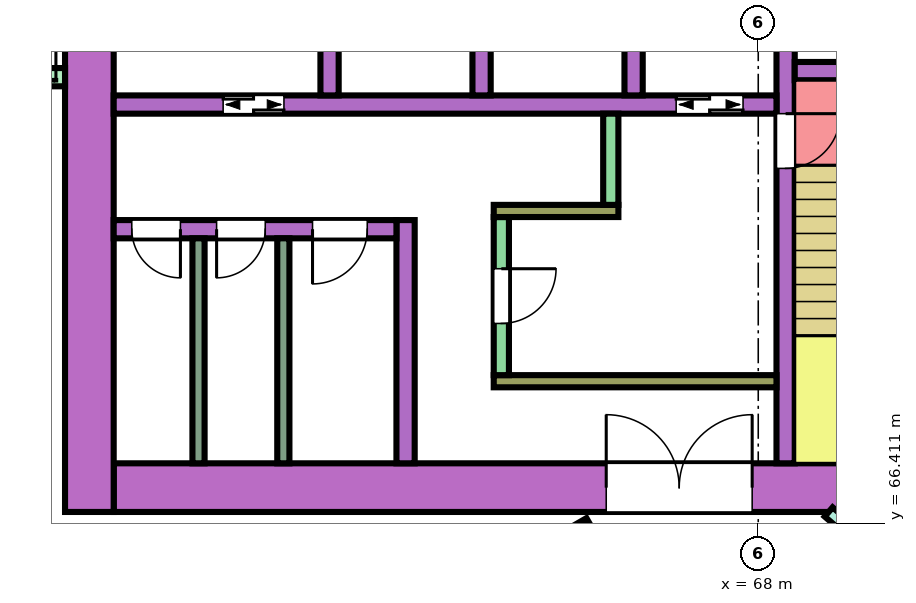
"""IFC4 building model, lengths in metres.
Left out: names, types, materials, properties, quantities, classifications, styles, units other than length and angle.
Written with IfcOpenShell. Run it as: python <this file> out.ifc"""

import sys

from ifc_helpers import new_model, si_unit, direction, frame, frame_2d, origin, place, context, subcontext, project, spatial, rectangle, extrude, element, fill, save


model = new_model("IFC4")
c1 = context("Model", 3, precision=1e-05, world=origin(), true_north=direction((0.0, 1.0)))
c2 = subcontext(c1, "Body", "Model", "MODEL_VIEW")
j1 = project(units=[si_unit("LENGTHUNIT", "METRE"), si_unit("PLANEANGLEUNIT", "RADIAN")], contexts=[c1])
p1 = place(None, origin())
s1 = spatial("IfcSite", under=j1, at=p1, CompositionType="ELEMENT")
p2 = place(p1, origin())
s2 = spatial("IfcBuilding", under=s1, at=p2, CompositionType="ELEMENT")
p3 = place(p2, frame((0.0, 0.0, 28.8)))
s3 = spatial("IfcBuildingStorey", under=s2, at=p3, CompositionType="ELEMENT", Elevation=28.8)
p4 = place(p3, frame((72.1, 67.0, 0.0), z_axis=(0.0, 0.0, 1.0), x_axis=(-1.0, 0.0, 0.0)))
e1 = element("IfcWall", 1, at=p4, inside=s3, PredefinedType="SHEAR", context=c2, shape_type="SweptSolid", body=[
    extrude(rectangle(XDim=14.7, YDim=0.8, at=frame_2d((7.35, 0.0))), origin(), (0.0, 0.0, 1.0), 3.48),
])
p5 = place(p4, frame((4.2, 0.0, 0.0)))
e2 = element("IfcOpeningElement", 2, at=p5, cuts=e1, PredefinedType="OPENING", context=c2, shape_type="SweptSolid", body=[
    extrude(rectangle(XDim=2.4, YDim=2.4, at=frame_2d((1.2, 1.2))), frame((0.0, 0.41, 0.0), z_axis=(0.0, -1.0, 0.0), x_axis=(1.0, 0.0, 0.0)), (0.0, 0.0, 1.0), 0.82),
])
p6 = place(p3, frame((57.0, 83.4, 0.0), z_axis=(0.0, 0.0, 1.0), x_axis=(0.0, -1.0, 0.0)))
e3 = element("IfcWall", 3, at=p6, inside=s3, PredefinedType="SHEAR", context=c2, shape_type="SweptSolid", body=[
    extrude(rectangle(XDim=16.8, YDim=0.8, at=frame_2d((8.4, 0.0))), origin(), (0.0, 0.0, 1.0), 3.48),
])
p7 = place(p3, frame((68.45, 75.0, 0.0), z_axis=(0.0, 0.0, 1.0), x_axis=(0.0, -1.0, 0.0)))
e4 = element("IfcWall", 4, at=p7, inside=s3, PredefinedType="SHEAR", context=c2, shape_type="SweptSolid", body=[
    extrude(rectangle(XDim=7.6, YDim=0.3, at=frame_2d((3.8, 0.0))), origin(), (0.0, 0.0, 1.0), 3.48),
])
p8 = place(p7, frame((1.85, 0.0, 0.0)))
e5 = element("IfcOpeningElement", 5, at=p8, cuts=e4, PredefinedType="OPENING", context=c2, shape_type="SweptSolid", body=[
    extrude(rectangle(XDim=0.9, YDim=2.1, at=frame_2d((0.45, 1.05))), frame((0.0, 0.16, 0.0), z_axis=(0.0, -1.0, 0.0), x_axis=(1.0, 0.0, 0.0)), (0.0, 0.0, 1.0), 0.32),
])
p9 = place(p3, frame((71.65, 73.85, 0.0), z_axis=(0.0, 0.0, 1.0), x_axis=(-1.0, 0.0, 0.0)))
e6 = element("IfcWall", 6, at=p9, inside=s3, PredefinedType="SHEAR", context=c2, shape_type="SweptSolid", body=[
    extrude(rectangle(XDim=3.05, YDim=0.3, at=frame_2d((1.525, 0.0))), origin(), (0.0, 0.0, 1.0), 3.48),
])
p10 = place(p9, frame((1.1, 0.0, 0.0)))
e7 = element("IfcOpeningElement", 7, at=p10, cuts=e6, PredefinedType="OPENING", context=c2, shape_type="SweptSolid", body=[
    extrude(rectangle(XDim=0.7, YDim=2.0, at=frame_2d((0.35, 1.0))), frame((0.0, 0.16, 0.0), z_axis=(0.0, -1.0, 0.0), x_axis=(1.0, 0.0, 0.0)), (0.0, 0.0, 1.0), 0.32),
])
p11 = place(p3, frame((68.3, 73.3, 0.0), z_axis=(0.0, 0.0, 1.0), x_axis=(-1.0, 0.0, 0.0)))
e8 = element("IfcWall", 8, at=p11, inside=s3, PredefinedType="SHEAR", context=c2, shape_type="SweptSolid", body=[
    extrude(rectangle(XDim=10.9, YDim=0.3, at=frame_2d((5.45, 0.0))), origin(), (0.0, 0.0, 1.0), 3.48),
])
p12 = place(p11, frame((0.55, 0.0, 0.0)))
e9 = element("IfcOpeningElement", 9, at=p12, cuts=e8, PredefinedType="OPENING", context=c2, shape_type="SweptSolid", body=[
    extrude(rectangle(XDim=1.1, YDim=2.1, at=frame_2d((0.55, 1.05))), frame((0.0, 0.16, 0.0), z_axis=(0.0, -1.0, 0.0), x_axis=(1.0, 0.0, 0.0)), (0.0, 0.0, 1.0), 0.32),
])
p13 = place(p11, frame((8.1, 0.0, 0.0)))
e10 = element("IfcOpeningElement", 10, at=p13, cuts=e8, PredefinedType="OPENING", context=c2, shape_type="SweptSolid", body=[
    extrude(rectangle(XDim=1.0, YDim=2.1, at=frame_2d((0.5, 1.05))), frame((0.0, 0.16, 0.0), z_axis=(0.0, -1.0, 0.0), x_axis=(1.0, 0.0, 0.0)), (0.0, 0.0, 1.0), 0.32),
])
for number, where, z_axis, x_axis in (
    (11, (65.95, 76.0, 0.0), (0.0, 0.0, 1.0), (0.0, -1.0, 0.0)),
    (12, (63.45, 76.0, 0.0), (0.0, 0.0, 1.0), (0.0, -1.0, 0.0)),
    (13, (60.95, 76.0, 0.0), (0.0, 0.0, 1.0), (0.0, -1.0, 0.0)),
):
    element("IfcWall", number, at=place(p3, frame(where, z_axis=z_axis, x_axis=x_axis)), inside=s3, PredefinedType="SHEAR", context=c2, shape_type="SweptSolid", body=[
        extrude(rectangle(XDim=2.55, YDim=0.3, at=frame_2d((1.275, 0.0))), origin(), (0.0, 0.0, 1.0), 3.48),
    ])
p14 = place(p3, frame((68.3, 68.75, 0.0), z_axis=(0.0, 0.0, 1.0), x_axis=(-1.0, 0.0, 0.0)))
e14 = element("IfcWall", 14, at=p14, inside=s3, PredefinedType="SHEAR", context=c2, shape_type="SweptSolid", body=[
    extrude(rectangle(XDim=4.65, YDim=0.2, at=frame_2d((2.325, 0.0))), origin(), (0.0, 0.0, 1.0), 3.48),
])
p15 = place(p3, frame((63.775, 71.45, 0.0), z_axis=(0.0, 0.0, 1.0), x_axis=(0.0, -1.0, 0.0)))
e15 = element("IfcWall", 15, at=p15, inside=s3, PredefinedType="SHEAR", context=c2, shape_type="SweptSolid", body=[
    extrude(rectangle(XDim=2.6, YDim=0.25, at=frame_2d((1.3, 0.0))), origin(), (0.0, 0.0, 1.0), 3.48),
])
p16 = place(p15, frame((0.85, 0.0, 0.0)))
e16 = element("IfcOpeningElement", 16, at=p16, cuts=e15, PredefinedType="OPENING", context=c2, shape_type="SweptSolid", body=[
    extrude(rectangle(XDim=0.9, YDim=2.1, at=frame_2d((0.45, 1.05))), frame((0.0, 0.135, 0.0), z_axis=(0.0, -1.0, 0.0), x_axis=(1.0, 0.0, 0.0)), (0.0, 0.0, 1.0), 0.27),
])
p17 = place(p3, frame((65.7, 71.55, 0.0), z_axis=(0.0, 0.0, 1.0), x_axis=(-1.0, 0.0, 0.0)))
e17 = element("IfcWall", 17, at=p17, inside=s3, PredefinedType="SHEAR", context=c2, shape_type="SweptSolid", body=[
    extrude(rectangle(XDim=2.05, YDim=0.2, at=frame_2d((1.025, 0.0))), origin(), (0.0, 0.0, 1.0), 3.48),
])
p18 = place(p3, frame((65.575, 73.15, 0.0), z_axis=(0.0, 0.0, 1.0), x_axis=(0.0, -1.0, 0.0)))
e18 = element("IfcWall", 18, at=p18, inside=s3, PredefinedType="SHEAR", context=c2, shape_type="SweptSolid", body=[
    extrude(rectangle(XDim=1.5, YDim=0.25, at=frame_2d((0.75, 0.0))), origin(), (0.0, 0.0, 1.0), 3.48),
])
p19 = place(p3, frame((62.2, 71.4, 0.0), z_axis=(0.0, 0.0, 1.0), x_axis=(0.0, -1.0, 0.0)))
e19 = element("IfcWall", 19, at=p19, inside=s3, PredefinedType="SHEAR", context=c2, shape_type="SweptSolid", body=[
    extrude(rectangle(XDim=4.0, YDim=0.3, at=frame_2d((2.0, 0.0))), origin(), (0.0, 0.0, 1.0), 3.48),
])
p20 = place(p3, frame((62.05, 71.25, 0.0), z_axis=(0.0, 0.0, 1.0), x_axis=(-1.0, 0.0, 0.0)))
e20 = element("IfcWall", 20, at=p20, inside=s3, PredefinedType="SHEAR", context=c2, shape_type="SweptSolid", body=[
    extrude(rectangle(XDim=4.65, YDim=0.3, at=frame_2d((2.325, 0.0))), origin(), (0.0, 0.0, 1.0), 3.48),
])
p21 = place(p20, frame((0.48, 0.0, 0.0)))
e21 = element("IfcOpeningElement", 21, at=p21, cuts=e20, PredefinedType="OPENING", context=c2, shape_type="SweptSolid", body=[
    extrude(rectangle(XDim=0.9, YDim=2.1, at=frame_2d((0.45, 1.05))), frame((0.0, 0.16, 0.0), z_axis=(0.0, -1.0, 0.0), x_axis=(1.0, 0.0, 0.0)), (0.0, 0.0, 1.0), 0.32),
])
p22 = place(p20, frame((2.157, 0.0, 0.0)))
e22 = element("IfcOpeningElement", 22, at=p22, cuts=e20, PredefinedType="OPENING", context=c2, shape_type="SweptSolid", body=[
    extrude(rectangle(XDim=0.8, YDim=2.1, at=frame_2d((0.4, 1.05))), frame((0.0, 0.16, 0.0), z_axis=(0.0, -1.0, 0.0), x_axis=(1.0, 0.0, 0.0)), (0.0, 0.0, 1.0), 0.32),
])
p23 = place(p20, frame((3.552, 0.0, 0.0)))
e23 = element("IfcOpeningElement", 23, at=p23, cuts=e20, PredefinedType="OPENING", context=c2, shape_type="SweptSolid", body=[
    extrude(rectangle(XDim=0.8, YDim=2.1, at=frame_2d((0.4, 1.05))), frame((0.0, 0.16, 0.0), z_axis=(0.0, -1.0, 0.0), x_axis=(1.0, 0.0, 0.0)), (0.0, 0.0, 1.0), 0.32),
])
p24 = place(p3, frame((54.983, 68.297, 0.0), z_axis=(0.0, 0.0, 1.0), x_axis=(0.382694096902, -0.923875115043, 0.0)))
e24 = element("IfcWall", 24, at=p24, inside=s3, PredefinedType="NOTDEFINED", context=c2, shape_type="SweptSolid", body=[
    extrude(rectangle(XDim=6.761, YDim=0.2, at=frame_2d((3.38, 0.0))), origin(), (0.0, 0.0, 1.0), 3.8),
])
p25 = place(p24, frame((0.527, 0.0, 0.9)))
e25 = element("IfcOpeningElement", 25, at=p25, cuts=e24, PredefinedType="OPENING", context=c2, shape_type="SweptSolid", body=[
    extrude(rectangle(XDim=1.2, YDim=2.4, at=frame_2d((0.6, 1.2))), frame((0.0, 0.11, 0.0), z_axis=(0.0, -1.0, 0.0), x_axis=(1.0, 0.0, 0.0)), (0.0, 0.0, 1.0), 0.22),
])
p26 = place(p24, frame((2.48, 0.0, 0.0)))
e26 = element("IfcOpeningElement", 26, at=p26, cuts=e24, PredefinedType="OPENING", context=c2, shape_type="SweptSolid", body=[
    extrude(rectangle(XDim=1.8, YDim=2.4, at=frame_2d((0.9, 1.2))), frame((0.0, 0.11, 0.0), z_axis=(0.0, -1.0, 0.0), x_axis=(1.0, 0.0, 0.0)), (0.0, 0.0, 1.0), 0.22),
])
p27 = place(p24, frame((5.034, 0.0, 0.9)))
e27 = element("IfcOpeningElement", 27, at=p27, cuts=e24, PredefinedType="OPENING", context=c2, shape_type="SweptSolid", body=[
    extrude(rectangle(XDim=1.2, YDim=2.4, at=frame_2d((0.6, 1.2))), frame((0.0, 0.11, 0.0), z_axis=(0.0, -1.0, 0.0), x_axis=(1.0, 0.0, 0.0)), (0.0, 0.0, 1.0), 0.22),
])
p28 = place(p3, frame((56.6, 73.75, 0.0), z_axis=(0.0, 0.0, 1.0), x_axis=(-1.0, 0.0, 0.0)))
e28 = element("IfcWall", 28, at=p28, inside=s3, PredefinedType="NOTDEFINED", context=c2, shape_type="SweptSolid", body=[
    extrude(rectangle(XDim=2.416, YDim=0.3, at=frame_2d((1.208, 0.0))), origin(), (0.0, 0.0, 1.0), 3.8),
])
p29 = place(p3, frame((69.158, 66.6, 0.0), z_axis=(0.0, 0.0, 1.0), x_axis=(0.757976058094, -0.652282373943, 0.0)))
e29 = element("IfcWall", 29, at=p29, inside=s3, PredefinedType="PARTITIONING", context=c2, shape_type="SweptSolid", body=[
    extrude(rectangle(XDim=5.16, YDim=0.2, at=frame_2d((2.58, 0.0))), origin(), (0.0, 0.0, 1.0), 3.35),
])
p30 = place(p29, frame((1.6, 0.0, 0.0)))
e30 = element("IfcOpeningElement", 30, at=p30, cuts=e29, PredefinedType="OPENING", context=c2, shape_type="SweptSolid", body=[
    extrude(rectangle(XDim=1.0, YDim=2.1, at=frame_2d((0.5, 1.05))), frame((0.0, 0.11, 0.0), z_axis=(0.0, -1.0, 0.0), x_axis=(1.0, 0.0, 0.0)), (0.0, 0.0, 1.0), 0.22),
])
p31 = place(p3, frame((57.659, 62.101, 0.0), z_axis=(0.0, 0.0, 1.0), x_axis=(0.86602264145, 0.500004784474, 0.0)))
e31 = element("IfcWall", 31, at=p31, inside=s3, PredefinedType="PARTITIONING", context=c2, shape_type="SweptSolid", body=[
    extrude(rectangle(XDim=8.708, YDim=0.1, at=frame_2d((4.354, 0.0))), origin(), (0.0, 0.0, 1.0), 3.35),
])
p32 = place(p31, frame((3.929, 0.0, 0.0)))
e32 = element("IfcOpeningElement", 32, at=p32, cuts=e31, PredefinedType="OPENING", context=c2, shape_type="SweptSolid", body=[
    extrude(rectangle(XDim=0.9, YDim=2.1, at=frame_2d((0.45, 1.05))), frame((0.0, 0.06, 0.0), z_axis=(0.0, -1.0, 0.0), x_axis=(1.0, 0.0, 0.0)), (0.0, 0.0, 1.0), 0.12),
])
for number, where, z_axis, x_axis in (
    (33, (60.19, 71.1, 0.0), (0.0, 0.0, 1.0), (0.0, -1.0, 0.0)),
    (34, (58.795, 71.1, 0.0), (0.0, 0.0, 1.0), (0.0, -1.0, 0.0)),
):
    element("IfcWall", number, at=place(p3, frame(where, z_axis=z_axis, x_axis=x_axis)), inside=s3, PredefinedType="PARTITIONING", context=c2, shape_type="SweptSolid", body=[
        extrude(rectangle(XDim=3.7, YDim=0.2, at=frame_2d((1.85, 0.0))), origin(), (0.0, 0.0, 1.0), 3.48),
    ])
p33 = place(p8, origin())
e35 = element("IfcDoor", 35, at=p33, inside=s3, OperationType="SINGLE_SWING_LEFT", PredefinedType="DOOR", context=c2, shape_type="SweptSolid", body=[
    extrude(rectangle(XDim=0.9, YDim=2.1, at=frame_2d((0.45, 1.05))), frame((0.0, 0.025, 0.0), z_axis=(0.0, -1.0, 0.0), x_axis=(1.0, 0.0, 0.0)), (0.0, 0.0, 1.0), 0.05),
])
fill(e5, e35)
p34 = place(p12, origin())
e36 = element("IfcDoor", 36, at=p34, inside=s3, OperationType="DOUBLE_DOOR_SLIDING", PredefinedType="DOOR", context=c2, shape_type="SweptSolid", body=[
    extrude(rectangle(XDim=1.1, YDim=2.1, at=frame_2d((0.55, 1.05))), frame((0.0, 0.025, 0.0), z_axis=(0.0, -1.0, 0.0), x_axis=(1.0, 0.0, 0.0)), (0.0, 0.0, 1.0), 0.05),
])
fill(e9, e36)
p35 = place(p13, origin())
e37 = element("IfcDoor", 37, at=p35, inside=s3, OperationType="DOUBLE_DOOR_SLIDING", PredefinedType="DOOR", context=c2, shape_type="SweptSolid", body=[
    extrude(rectangle(XDim=1.0, YDim=2.1, at=frame_2d((0.5, 1.05))), frame((0.0, 0.025, 0.0), z_axis=(0.0, -1.0, 0.0), x_axis=(1.0, 0.0, 0.0)), (0.0, 0.0, 1.0), 0.05),
])
fill(e10, e37)
p36 = place(p16, origin())
e38 = element("IfcDoor", 38, at=p36, inside=s3, OperationType="SINGLE_SWING_LEFT", PredefinedType="DOOR", context=c2, shape_type="SweptSolid", body=[
    extrude(rectangle(XDim=0.9, YDim=2.1, at=frame_2d((0.45, 1.05))), frame((0.0, 0.025, 0.0), z_axis=(0.0, -1.0, 0.0), x_axis=(1.0, 0.0, 0.0)), (0.0, 0.0, 1.0), 0.05),
])
fill(e16, e38)
p37 = place(p21, origin())
e39 = element("IfcDoor", 39, at=p37, inside=s3, OperationType="SINGLE_SWING_RIGHT", PredefinedType="DOOR", context=c2, shape_type="SweptSolid", body=[
    extrude(rectangle(XDim=0.9, YDim=2.1, at=frame_2d((0.45, 1.05))), frame((0.0, 0.025, 0.0), z_axis=(0.0, -1.0, 0.0), x_axis=(1.0, 0.0, 0.0)), (0.0, 0.0, 1.0), 0.05),
])
fill(e21, e39)
p38 = place(p22, origin())
e40 = element("IfcDoor", 40, at=p38, inside=s3, OperationType="SINGLE_SWING_RIGHT", PredefinedType="DOOR", context=c2, shape_type="SweptSolid", body=[
    extrude(rectangle(XDim=0.8, YDim=2.1, at=frame_2d((0.4, 1.05))), frame((0.0, 0.025, 0.0), z_axis=(0.0, -1.0, 0.0), x_axis=(1.0, 0.0, 0.0)), (0.0, 0.0, 1.0), 0.05),
])
fill(e22, e40)
p39 = place(p23, origin())
e41 = element("IfcDoor", 41, at=p39, inside=s3, OperationType="SINGLE_SWING_LEFT", PredefinedType="DOOR", context=c2, shape_type="SweptSolid", body=[
    extrude(rectangle(XDim=0.8, YDim=2.1, at=frame_2d((0.4, 1.05))), frame((0.0, 0.025, 0.0), z_axis=(0.0, -1.0, 0.0), x_axis=(1.0, 0.0, 0.0)), (0.0, 0.0, 1.0), 0.05),
])
fill(e23, e41)
p40 = place(p5, frame((2.4, 0.0, 0.0), z_axis=(0.0, 0.0, 1.0), x_axis=(-1.0, 0.0, 0.0)))
e42 = element("IfcDoor", 42, at=p40, inside=s3, OperationType="DOUBLE_DOOR_SINGLE_SWING", PredefinedType="DOOR", context=c2, shape_type="SweptSolid", body=[
    extrude(rectangle(XDim=2.4, YDim=2.4, at=frame_2d((1.2, 1.2))), frame((0.0, 0.025, 0.0), z_axis=(0.0, -1.0, 0.0), x_axis=(1.0, 0.0, 0.0)), (0.0, 0.0, 1.0), 0.05),
])
fill(e2, e42)
save(model, sys.argv[1])
